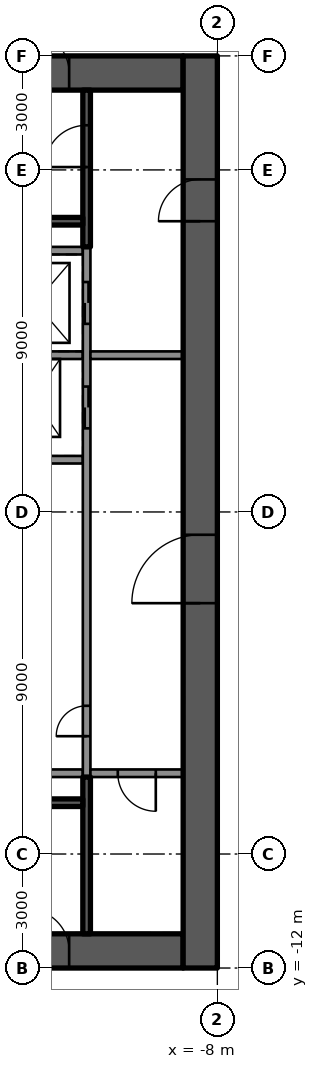
"""IFC4 building model, lengths in metres.
Left out: names, types, materials, properties, quantities, classifications, styles, units other than length and angle.
Written with IfcOpenShell. Run it as: python <this file> out.ifc"""

import sys

from ifc_helpers import new_model, si_unit, direction, frame, frame_2d, origin, place, context, subcontext, project, spatial, rectangle, extrude, element, fill, save


model = new_model("IFC4")
c1 = context("Model", 3, precision=1e-05, world=origin(), true_north=direction((0.0, 1.0)))
c2 = subcontext(c1, "Body", "Model", "MODEL_VIEW")
j1 = project(units=[si_unit("LENGTHUNIT", "METRE"), si_unit("PLANEANGLEUNIT", "RADIAN")], contexts=[c1])
p1 = place(None, origin())
s1 = spatial("IfcSite", under=j1, at=p1, CompositionType="ELEMENT")
p2 = place(p1, origin())
s2 = spatial("IfcBuilding", under=s1, at=p2, CompositionType="ELEMENT")
p3 = place(p2, frame((0.0, 0.0, 181.1)))
s3 = spatial("IfcBuildingStorey", under=s2, at=p3, CompositionType="ELEMENT", Elevation=181.1)
p4 = place(p3, frame((-18.1, 11.55, 0.0), z_axis=(0.0, 0.0, 1.0), x_axis=(1.0, 0.0, 0.0)))
e1 = element("IfcWall", 1, at=p4, inside=s3, PredefinedType="SHEAR", context=c2, shape_type="SweptSolid", body=[
    extrude(rectangle(XDim=9.2, YDim=0.9, at=frame_2d((4.6, 0.0))), origin(), (0.0, 0.0, 1.0), 3.5),
])
p5 = place(p4, frame((5.1, 0.0, 0.0)))
e2 = element("IfcOpeningElement", 2, at=p5, cuts=e1, PredefinedType="OPENING", context=c2, shape_type="SweptSolid", body=[
    extrude(rectangle(XDim=1.1, YDim=2.1, at=frame_2d((0.55, 1.05))), frame((0.0, 0.46, 0.0), z_axis=(0.0, -1.0, 0.0), x_axis=(1.0, 0.0, 0.0)), (0.0, 0.0, 1.0), 0.92),
])
p6 = place(p3, frame((-18.1, -11.55, 0.0), z_axis=(0.0, 0.0, 1.0), x_axis=(1.0, 0.0, 0.0)))
e3 = element("IfcWall", 3, at=p6, inside=s3, PredefinedType="SHEAR", context=c2, shape_type="SweptSolid", body=[
    extrude(rectangle(XDim=9.2, YDim=0.9, at=frame_2d((4.6, 0.0))), origin(), (0.0, 0.0, 1.0), 3.5),
])
p7 = place(p6, frame((5.1, 0.0, 0.0)))
e4 = element("IfcOpeningElement", 4, at=p7, cuts=e3, PredefinedType="OPENING", context=c2, shape_type="SweptSolid", body=[
    extrude(rectangle(XDim=1.1, YDim=2.1, at=frame_2d((0.55, 1.05))), frame((0.0, 0.46, 0.0), z_axis=(0.0, -1.0, 0.0), x_axis=(1.0, 0.0, 0.0)), (0.0, 0.0, 1.0), 0.92),
])
p8 = place(p3, frame((-8.45, -12.0, 0.0), z_axis=(0.0, 0.0, 1.0), x_axis=(0.0, 1.0, 0.0)))
e5 = element("IfcWall", 5, at=p8, inside=s3, PredefinedType="SHEAR", context=c2, shape_type="SweptSolid", body=[
    extrude(rectangle(XDim=24.0, YDim=0.9, at=frame_2d((12.0, 0.0))), origin(), (0.0, 0.0, 1.0), 3.5),
])
p9 = place(p8, frame((9.6, 0.0, 0.0)))
e6 = element("IfcOpeningElement", 6, at=p9, cuts=e5, PredefinedType="OPENING", context=c2, shape_type="SweptSolid", body=[
    extrude(rectangle(XDim=1.8, YDim=2.1, at=frame_2d((0.9, 1.05))), frame((0.0, 0.46, 0.0), z_axis=(0.0, -1.0, 0.0), x_axis=(1.0, 0.0, 0.0)), (0.0, 0.0, 1.0), 0.92),
])
p10 = place(p8, frame((19.65, 0.0, 0.0)))
e7 = element("IfcOpeningElement", 7, at=p10, cuts=e5, PredefinedType="OPENING", context=c2, shape_type="SweptSolid", body=[
    extrude(rectangle(XDim=1.1, YDim=2.1, at=frame_2d((0.55, 1.05))), frame((0.0, 0.46, 0.0), z_axis=(0.0, -1.0, 0.0), x_axis=(1.0, 0.0, 0.0)), (0.0, 0.0, 1.0), 0.92),
])
for number, where, z_axis, x_axis in (
    (8, (-11.54, 6.875, 0.0), (0.0, 0.0, 1.0), (-1.0, 0.0, 0.0)),
    (9, (-11.54, -6.875, 0.0), (0.0, 0.0, 1.0), (-1.0, 0.0, 0.0)),
):
    element("IfcWall", number, at=place(p3, frame(where, z_axis=z_axis, x_axis=x_axis)), inside=s3, PredefinedType="SOLIDWALL", context=c2, shape_type="SweptSolid", body=[
        extrude(rectangle(XDim=6.56, YDim=0.2, at=frame_2d((3.28, 0.0))), origin(), (0.0, 0.0, 1.0), 3.08),
    ])
p11 = place(p3, frame((-11.54, 1.375, 0.0), z_axis=(0.0, 0.0, 1.0), x_axis=(-1.0, 0.0, 0.0)))
e10 = element("IfcWall", 10, at=p11, inside=s3, PredefinedType="SOLIDWALL", context=c2, shape_type="SweptSolid", body=[
    extrude(rectangle(XDim=4.2, YDim=0.2, at=frame_2d((2.1, 0.0))), origin(), (0.0, 0.0, 1.0), 3.08),
])
p12 = place(p3, frame((-11.54, 4.125, 0.0), z_axis=(0.0, 0.0, 1.0), x_axis=(-1.0, 0.0, 0.0)))
e11 = element("IfcWall", 11, at=p12, inside=s3, PredefinedType="SOLIDWALL", context=c2, shape_type="SweptSolid", body=[
    extrude(rectangle(XDim=4.7, YDim=0.2, at=frame_2d((2.35, 0.0))), origin(), (0.0, 0.0, 1.0), 3.08),
])
p13 = place(p3, frame((-11.44, -6.975, 0.0), z_axis=(0.0, 0.0, 1.0), x_axis=(0.0, 1.0, 0.0)))
e12 = element("IfcWall", 12, at=p13, inside=s3, PredefinedType="SOLIDWALL", context=c2, shape_type="SweptSolid", body=[
    extrude(rectangle(XDim=13.95, YDim=0.2, at=frame_2d((6.975, 0.0))), origin(), (0.0, 0.0, 1.0), 3.08),
])
p14 = place(p13, frame((9.175, 0.0, 0.0)))
e13 = element("IfcOpeningElement", 13, at=p14, cuts=e12, PredefinedType="OPENING", context=c2, shape_type="SweptSolid", body=[
    extrude(rectangle(XDim=1.1, YDim=2.1, at=frame_2d((0.55, 1.05))), frame((0.0, 0.11, 0.0), z_axis=(0.0, -1.0, 0.0), x_axis=(1.0, 0.0, 0.0)), (0.0, 0.0, 1.0), 0.22),
])
p15 = place(p13, frame((11.925, 0.0, 0.0)))
e14 = element("IfcOpeningElement", 14, at=p15, cuts=e12, PredefinedType="OPENING", context=c2, shape_type="SweptSolid", body=[
    extrude(rectangle(XDim=1.1, YDim=2.1, at=frame_2d((0.55, 1.05))), frame((0.0, 0.11, 0.0), z_axis=(0.0, -1.0, 0.0), x_axis=(1.0, 0.0, 0.0)), (0.0, 0.0, 1.0), 0.22),
])
p16 = place(p13, frame((1.075, 0.0, 0.0)))
e15 = element("IfcOpeningElement", 15, at=p16, cuts=e12, PredefinedType="OPENING", context=c2, shape_type="SweptSolid", body=[
    extrude(rectangle(XDim=0.8, YDim=2.1, at=frame_2d((0.4, 1.05))), frame((0.0, 0.11, 0.0), z_axis=(0.0, -1.0, 0.0), x_axis=(1.0, 0.0, 0.0)), (0.0, 0.0, 1.0), 0.22),
])
p17 = place(p3, frame((-11.44, 6.975, 0.0), z_axis=(0.0, 0.0, 1.0), x_axis=(0.0, 1.0, 0.0)))
e16 = element("IfcWall", 16, at=p17, inside=s3, PredefinedType="SOLIDWALL", context=c2, shape_type="SweptSolid", body=[
    extrude(rectangle(XDim=4.125, YDim=0.2, at=frame_2d((2.062, 0.0))), origin(), (0.0, 0.0, 1.0), 3.08),
])
p18 = place(p17, frame((2.1, 0.0, 0.0)))
e17 = element("IfcOpeningElement", 17, at=p18, cuts=e16, PredefinedType="OPENING", context=c2, shape_type="SweptSolid", body=[
    extrude(rectangle(XDim=1.1, YDim=2.1, at=frame_2d((0.55, 1.05))), frame((0.0, 0.11, 0.0), z_axis=(0.0, -1.0, 0.0), x_axis=(1.0, 0.0, 0.0)), (0.0, 0.0, 1.0), 0.22),
])
p19 = place(p3, frame((-11.54, 7.65, 0.0), z_axis=(0.0, 0.0, 1.0), x_axis=(-1.0, 0.0, 0.0)))
e18 = element("IfcWall", 18, at=p19, inside=s3, PredefinedType="SOLIDWALL", context=c2, shape_type="SweptSolid", body=[
    extrude(rectangle(XDim=6.56, YDim=0.2, at=frame_2d((3.28, 0.0))), origin(), (0.0, 0.0, 1.0), 3.08),
])
p20 = place(p3, frame((-11.44, -11.1, 0.0), z_axis=(0.0, 0.0, 1.0), x_axis=(0.0, 1.0, 0.0)))
e19 = element("IfcWall", 19, at=p20, inside=s3, PredefinedType="SOLIDWALL", context=c2, shape_type="SweptSolid", body=[
    extrude(rectangle(XDim=4.125, YDim=0.2, at=frame_2d((2.062, 0.0))), origin(), (0.0, 0.0, 1.0), 3.08),
])
p21 = place(p3, frame((-11.54, -7.65, 0.0), z_axis=(0.0, 0.0, 1.0), x_axis=(-1.0, 0.0, 0.0)))
e20 = element("IfcWall", 20, at=p21, inside=s3, PredefinedType="SOLIDWALL", context=c2, shape_type="SweptSolid", body=[
    extrude(rectangle(XDim=6.56, YDim=0.2, at=frame_2d((3.28, 0.0))), origin(), (0.0, 0.0, 1.0), 3.08),
])
p22 = place(p3, frame((-8.9, 4.125, 0.0), z_axis=(0.0, 0.0, 1.0), x_axis=(-1.0, 0.0, 0.0)))
e21 = element("IfcWall", 21, at=p22, inside=s3, PredefinedType="PARTITIONING", context=c2, shape_type="SweptSolid", body=[
    extrude(rectangle(XDim=2.44, YDim=0.2, at=frame_2d((1.22, 0.0))), origin(), (0.0, 0.0, 1.0), 3.08),
])
p23 = place(p3, frame((-8.9, -6.875, 0.0), z_axis=(0.0, 0.0, 1.0), x_axis=(-1.0, 0.0, 0.0)))
e22 = element("IfcWall", 22, at=p23, inside=s3, PredefinedType="PARTITIONING", context=c2, shape_type="SweptSolid", body=[
    extrude(rectangle(XDim=2.44, YDim=0.2, at=frame_2d((1.22, 0.0))), origin(), (0.0, 0.0, 1.0), 3.08),
])
p24 = place(p23, frame((0.72, 0.0, 0.0)))
e23 = element("IfcOpeningElement", 23, at=p24, cuts=e22, PredefinedType="OPENING", context=c2, shape_type="SweptSolid", body=[
    extrude(rectangle(XDim=1.0, YDim=2.1, at=frame_2d((0.5, 1.05))), frame((0.0, 0.11, 0.0), z_axis=(0.0, -1.0, 0.0), x_axis=(1.0, 0.0, 0.0)), (0.0, 0.0, 1.0), 0.22),
])
p25 = place(p14, origin())
e24 = element("IfcDoor", 24, at=p25, inside=s3, OperationType="DOUBLE_DOOR_SLIDING", PredefinedType="DOOR", context=c2, shape_type="SweptSolid", body=[
    extrude(rectangle(XDim=1.1, YDim=2.1, at=frame_2d((0.55, 1.05))), frame((0.0, 0.025, 0.0), z_axis=(0.0, -1.0, 0.0), x_axis=(1.0, 0.0, 0.0)), (0.0, 0.0, 1.0), 0.05),
])
fill(e13, e24)
p26 = place(p15, origin())
e25 = element("IfcDoor", 25, at=p26, inside=s3, OperationType="DOUBLE_DOOR_SLIDING", PredefinedType="DOOR", context=c2, shape_type="SweptSolid", body=[
    extrude(rectangle(XDim=1.1, YDim=2.1, at=frame_2d((0.55, 1.05))), frame((0.0, 0.025, 0.0), z_axis=(0.0, -1.0, 0.0), x_axis=(1.0, 0.0, 0.0)), (0.0, 0.0, 1.0), 0.05),
])
fill(e14, e25)
p27 = place(p16, origin())
e26 = element("IfcDoor", 26, at=p27, inside=s3, OperationType="SINGLE_SWING_LEFT", PredefinedType="DOOR", context=c2, shape_type="SweptSolid", body=[
    extrude(rectangle(XDim=0.8, YDim=2.1, at=frame_2d((0.4, 1.05))), frame((0.0, 0.025, 0.0), z_axis=(0.0, -1.0, 0.0), x_axis=(1.0, 0.0, 0.0)), (0.0, 0.0, 1.0), 0.05),
])
fill(e15, e26)
p28 = place(p9, origin())
e27 = element("IfcDoor", 27, at=p28, inside=s3, OperationType="SINGLE_SWING_LEFT", PredefinedType="DOOR", context=c2, shape_type="SweptSolid", body=[
    extrude(rectangle(XDim=1.8, YDim=2.1, at=frame_2d((0.9, 1.05))), frame((0.0, 0.025, 0.0), z_axis=(0.0, -1.0, 0.0), x_axis=(1.0, 0.0, 0.0)), (0.0, 0.0, 1.0), 0.05),
])
fill(e6, e27)
p29 = place(p10, origin())
e28 = element("IfcDoor", 28, at=p29, inside=s3, OperationType="SINGLE_SWING_RIGHT", PredefinedType="DOOR", context=c2, shape_type="SweptSolid", body=[
    extrude(rectangle(XDim=1.1, YDim=2.1, at=frame_2d((0.55, 1.05))), frame((0.0, 0.025, 0.0), z_axis=(0.0, -1.0, 0.0), x_axis=(1.0, 0.0, 0.0)), (0.0, 0.0, 1.0), 0.05),
])
fill(e7, e28)
p30 = place(p5, origin())
e29 = element("IfcDoor", 29, at=p30, inside=s3, OperationType="SINGLE_SWING_RIGHT", PredefinedType="DOOR", context=c2, shape_type="SweptSolid", body=[
    extrude(rectangle(XDim=1.1, YDim=2.1, at=frame_2d((0.55, 1.05))), frame((0.0, 0.025, 0.0), z_axis=(0.0, -1.0, 0.0), x_axis=(1.0, 0.0, 0.0)), (0.0, 0.0, 1.0), 0.05),
])
fill(e2, e29)
p31 = place(p7, origin())
e30 = element("IfcDoor", 30, at=p31, inside=s3, OperationType="SINGLE_SWING_RIGHT", PredefinedType="DOOR", context=c2, shape_type="SweptSolid", body=[
    extrude(rectangle(XDim=1.1, YDim=2.1, at=frame_2d((0.55, 1.05))), frame((0.0, 0.025, 0.0), z_axis=(0.0, -1.0, 0.0), x_axis=(1.0, 0.0, 0.0)), (0.0, 0.0, 1.0), 0.05),
])
fill(e4, e30)
p32 = place(p18, origin())
e31 = element("IfcDoor", 31, at=p32, inside=s3, OperationType="SINGLE_SWING_RIGHT", PredefinedType="DOOR", context=c2, shape_type="SweptSolid", body=[
    extrude(rectangle(XDim=1.1, YDim=2.1, at=frame_2d((0.55, 1.05))), frame((0.0, 0.025, 0.0), z_axis=(0.0, -1.0, 0.0), x_axis=(1.0, 0.0, 0.0)), (0.0, 0.0, 1.0), 0.05),
])
fill(e17, e31)
p33 = place(p24, origin())
e32 = element("IfcDoor", 32, at=p33, inside=s3, OperationType="SINGLE_SWING_RIGHT", PredefinedType="DOOR", context=c2, shape_type="SweptSolid", body=[
    extrude(rectangle(XDim=1.0, YDim=2.1, at=frame_2d((0.5, 1.05))), frame((0.0, 0.025, 0.0), z_axis=(0.0, -1.0, 0.0), x_axis=(1.0, 0.0, 0.0)), (0.0, 0.0, 1.0), 0.05),
])
fill(e23, e32)
save(model, sys.argv[1])
